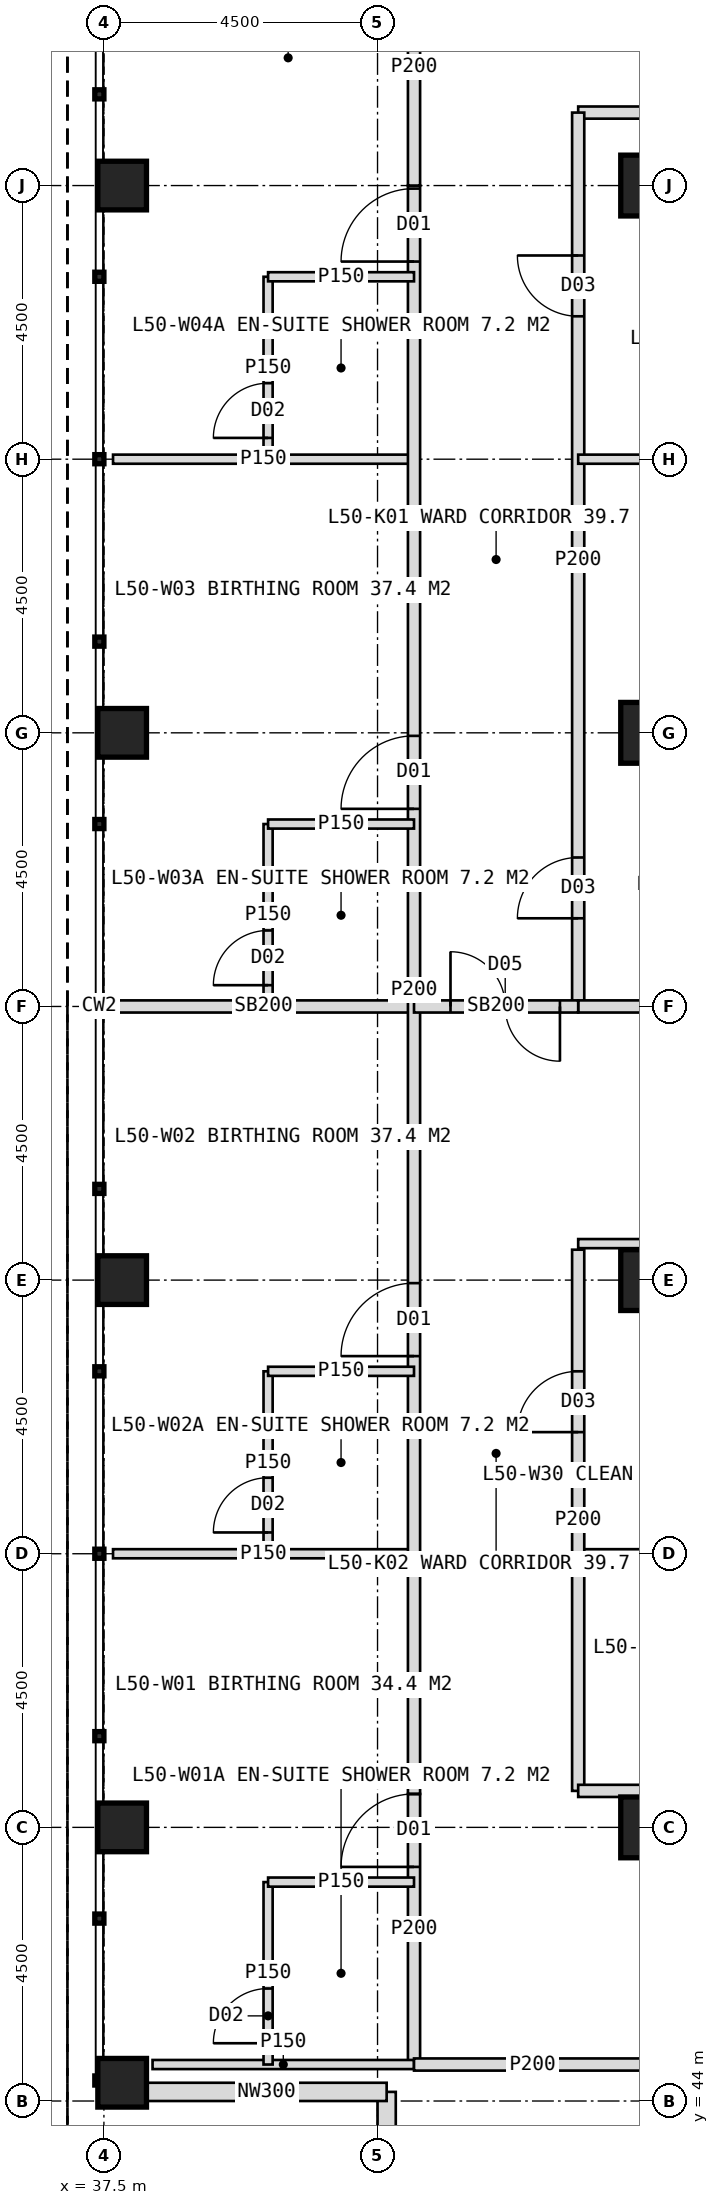
"""IFC4 building model, lengths in metres.
Left out: names, types, materials, properties, quantities, classifications, styles, units other than length and angle.
Written with IfcOpenShell. Run it as: python <this file> out.ifc"""

import sys

from ifc_helpers import new_model, si_unit, direction, frame, frame_2d, origin, origin_2d, place, context, subcontext, project, spatial, rectangle, hollow_rectangle, extrude, element, fill, save


model = new_model("IFC4")
c1 = context("Model", 3, precision=1e-05, world=origin(), true_north=direction((0.0, 1.0)))
c2 = subcontext(c1, "Body", "Model", "MODEL_VIEW")
j1 = project(units=[si_unit("LENGTHUNIT", "METRE"), si_unit("PLANEANGLEUNIT", "RADIAN")], contexts=[c1])
p1 = place(None, origin())
s1 = spatial("IfcSite", under=j1, at=p1, CompositionType="ELEMENT")
p2 = place(p1, origin())
s2 = spatial("IfcBuilding", under=s1, at=p2, CompositionType="ELEMENT")
p3 = place(p2, frame((0.0, 0.0, 209.0)))
s3 = spatial("IfcBuildingStorey", under=s2, at=p3, CompositionType="ELEMENT", Elevation=209.0)
for number, where, z_axis, x_axis in (
    (1, (46.5, 48.5, 0.0), (0.0, 0.0, 1.0), (1.0, 0.0, 0.0)),
    (2, (46.5, 75.5, 0.0), (0.0, 0.0, 1.0), (1.0, 0.0, 0.0)),
    (3, (46.5, 57.5, 0.0), (0.0, 0.0, 1.0), (1.0, 0.0, 0.0)),
    (4, (46.5, 66.5, 0.0), (0.0, 0.0, 1.0), (1.0, 0.0, 0.0)),
):
    element("IfcColumn", number, at=place(p3, frame(where, z_axis=z_axis, x_axis=x_axis)), inside=s3, PredefinedType="COLUMN", context=c2, shape_type="SweptSolid", body=[
        extrude(hollow_rectangle(XDim=1.0, YDim=1.0, WallThickness=0.1, at=origin_2d()), origin(), (0.0, 0.0, 1.0), 4.0),
    ])
for number, where, z_axis, x_axis in (
    (5, (37.8, 44.3, 0.0), (0.0, 0.0, 1.0), (1.0, 0.0, 0.0)),
    (6, (37.8, 48.5, 0.0), (0.0, 0.0, 1.0), (1.0, 0.0, 0.0)),
    (7, (37.8, 57.5, 0.0), (0.0, 0.0, 1.0), (1.0, 0.0, 0.0)),
    (8, (37.8, 66.5, 0.0), (0.0, 0.0, 1.0), (1.0, 0.0, 0.0)),
    (9, (37.8, 75.5, 0.0), (0.0, 0.0, 1.0), (1.0, 0.0, 0.0)),
):
    element("IfcColumn", number, at=place(p3, frame(where, z_axis=z_axis, x_axis=x_axis)), inside=s3, PredefinedType="COLUMN", context=c2, shape_type="SweptSolid", body=[
        extrude(hollow_rectangle(XDim=0.8, YDim=0.8, WallThickness=0.08, at=origin_2d()), origin(), (0.0, 0.0, 1.0), 4.0),
    ])
for number, where, z_axis, x_axis in (
    (10, (42.15, 40.2, 0.0), (0.0, 0.0, 1.0), (0.0, 1.0, 0.0)),
    (11, (42.15, 44.15, 0.0), (0.0, 0.0, 1.0), (-1.0, 0.0, 0.0)),
):
    element("IfcWall", number, at=place(p3, frame(where, z_axis=z_axis, x_axis=x_axis)), inside=s3, PredefinedType="ELEMENTEDWALL", context=c2, shape_type="SweptSolid", body=[
        extrude(rectangle(XDim=3.95, YDim=0.3, at=frame_2d((1.975, 0.0))), origin(), (0.0, 0.0, 1.0), 2.85),
    ])
p4 = place(p3, frame((45.3, 76.7, 0.0), z_axis=(0.0, 0.0, 1.0), x_axis=(1.0, 0.0, 0.0)))
e12 = element("IfcWall", 12, at=p4, inside=s3, PredefinedType="PARTITIONING", context=c2, shape_type="SweptSolid", body=[
    extrude(rectangle(XDim=5.7, YDim=0.2, at=frame_2d((2.85, 0.0))), origin(), (0.0, 0.0, 1.0), 3.75),
])
p5 = place(p3, frame((42.6, 53.0, 0.0), z_axis=(0.0, 0.0, 1.0), x_axis=(-1.0, 0.0, 0.0)))
e13 = element("IfcWall", 13, at=p5, inside=s3, PredefinedType="PARTITIONING", context=c2, shape_type="SweptSolid", body=[
    extrude(rectangle(XDim=4.95, YDim=0.15, at=frame_2d((2.475, 0.0))), origin(), (0.0, 0.0, 1.0), 3.75),
])
p6 = place(p3, frame((42.6, 62.0, 0.0), z_axis=(0.0, 0.0, 1.0), x_axis=(-1.0, 0.0, 0.0)))
e14 = element("IfcWall", 14, at=p6, inside=s3, PredefinedType="SOLIDWALL", context=c2, shape_type="SweptSolid", body=[
    extrude(rectangle(XDim=4.95, YDim=0.2, at=frame_2d((2.475, 0.0))), origin(), (0.0, 0.0, 1.0), 2.95),
])
p7 = place(p3, frame((42.6, 71.0, 0.0), z_axis=(0.0, 0.0, 1.0), x_axis=(-1.0, 0.0, 0.0)))
e15 = element("IfcWall", 15, at=p7, inside=s3, PredefinedType="PARTITIONING", context=c2, shape_type="SweptSolid", body=[
    extrude(rectangle(XDim=4.95, YDim=0.15, at=frame_2d((2.475, 0.0))), origin(), (0.0, 0.0, 1.0), 3.75),
])
p8 = place(p3, frame((42.6, 44.6, 0.0), z_axis=(0.0, 0.0, 1.0), x_axis=(0.0, 1.0, 0.0)))
e16 = element("IfcWall", 16, at=p8, inside=s3, PredefinedType="PARTITIONING", context=c2, shape_type="SweptSolid", body=[
    extrude(rectangle(XDim=4.45, YDim=0.2, at=frame_2d((2.225, 0.0))), origin(), (0.0, 0.0, 1.0), 2.85),
])
p9 = place(p8, frame((3.25, 0.0, 0.0)))
e17 = element("IfcOpeningElement", 17, at=p9, cuts=e16, PredefinedType="OPENING", context=c2, shape_type="SweptSolid", body=[
    extrude(rectangle(XDim=1.2, YDim=2.2, at=frame_2d((0.6, 1.1))), frame((0.0, 0.11, 0.0), z_axis=(0.0, -1.0, 0.0), x_axis=(1.0, 0.0, 0.0)), (0.0, 0.0, 1.0), 0.22),
])
p10 = place(p3, frame((42.6, 49.05, 0.0), z_axis=(0.0, 0.0, 1.0), x_axis=(0.0, 1.0, 0.0)))
e18 = element("IfcWall", 18, at=p10, inside=s3, PredefinedType="PARTITIONING", context=c2, shape_type="SweptSolid", body=[
    extrude(rectangle(XDim=26.45, YDim=0.2, at=frame_2d((13.225, 0.0))), origin(), (0.0, 0.0, 1.0), 3.75),
])
p11 = place(p10, frame((7.2, 0.0, 0.0)))
e19 = element("IfcOpeningElement", 19, at=p11, cuts=e18, PredefinedType="OPENING", context=c2, shape_type="SweptSolid", body=[
    extrude(rectangle(XDim=1.2, YDim=2.2, at=frame_2d((0.6, 1.1))), frame((0.0, 0.11, 0.0), z_axis=(0.0, -1.0, 0.0), x_axis=(1.0, 0.0, 0.0)), (0.0, 0.0, 1.0), 0.22),
])
p12 = place(p10, frame((16.2, 0.0, 0.0)))
e20 = element("IfcOpeningElement", 20, at=p12, cuts=e18, PredefinedType="OPENING", context=c2, shape_type="SweptSolid", body=[
    extrude(rectangle(XDim=1.2, YDim=2.2, at=frame_2d((0.6, 1.1))), frame((0.0, 0.11, 0.0), z_axis=(0.0, -1.0, 0.0), x_axis=(1.0, 0.0, 0.0)), (0.0, 0.0, 1.0), 0.22),
])
p13 = place(p10, frame((25.2, 0.0, 0.0)))
e21 = element("IfcOpeningElement", 21, at=p13, cuts=e18, PredefinedType="OPENING", context=c2, shape_type="SweptSolid", body=[
    extrude(rectangle(XDim=1.2, YDim=2.2, at=frame_2d((0.6, 1.1))), frame((0.0, 0.11, 0.0), z_axis=(0.0, -1.0, 0.0), x_axis=(1.0, 0.0, 0.0)), (0.0, 0.0, 1.0), 0.22),
])
p14 = place(p3, frame((42.6, 75.5, 0.0), z_axis=(0.0, 0.0, 1.0), x_axis=(0.0, 1.0, 0.0)))
e22 = element("IfcWall", 22, at=p14, inside=s3, PredefinedType="PARTITIONING", context=c2, shape_type="SweptSolid", body=[
    extrude(rectangle(XDim=3.9, YDim=0.2, at=frame_2d((1.95, 0.0))), origin(), (0.0, 0.0, 1.0), 2.85),
])
p15 = place(p3, frame((42.6, 44.6, 0.0), z_axis=(0.0, 0.0, 1.0), x_axis=(-1.0, 0.0, 0.0)))
e23 = element("IfcWall", 23, at=p15, inside=s3, PredefinedType="PARTITIONING", context=c2, shape_type="SweptSolid", body=[
    extrude(rectangle(XDim=4.3, YDim=0.15, at=frame_2d((2.15, 0.0))), origin(), (0.0, 0.0, 1.0), 2.85),
])
p16 = place(p3, frame((40.2, 44.6, 0.0), z_axis=(0.0, 0.0, 1.0), x_axis=(0.0, 1.0, 0.0)))
e24 = element("IfcWall", 24, at=p16, inside=s3, PredefinedType="PARTITIONING", context=c2, shape_type="SweptSolid", body=[
    extrude(rectangle(XDim=3.0, YDim=0.15, at=frame_2d((1.5, 0.0))), origin(), (0.0, 0.0, 1.0), 3.75),
])
p17 = place(p16, frame((0.35, 0.0, 0.0)))
e25 = element("IfcOpeningElement", 25, at=p17, cuts=e24, PredefinedType="OPENING", context=c2, shape_type="SweptSolid", body=[
    extrude(rectangle(XDim=0.9, YDim=2.1, at=frame_2d((0.45, 1.05))), frame((0.0, 0.085, 0.0), z_axis=(0.0, -1.0, 0.0), x_axis=(1.0, 0.0, 0.0)), (0.0, 0.0, 1.0), 0.17),
])
p18 = place(p3, frame((42.6, 47.6, 0.0), z_axis=(0.0, 0.0, 1.0), x_axis=(-1.0, 0.0, 0.0)))
e26 = element("IfcWall", 26, at=p18, inside=s3, PredefinedType="PARTITIONING", context=c2, shape_type="SweptSolid", body=[
    extrude(rectangle(XDim=2.4, YDim=0.15, at=frame_2d((1.2, 0.0))), origin(), (0.0, 0.0, 1.0), 3.75),
])
p19 = place(p3, frame((40.2, 53.0, 0.0), z_axis=(0.0, 0.0, 1.0), x_axis=(0.0, 1.0, 0.0)))
e27 = element("IfcWall", 27, at=p19, inside=s3, PredefinedType="PARTITIONING", context=c2, shape_type="SweptSolid", body=[
    extrude(rectangle(XDim=3.0, YDim=0.15, at=frame_2d((1.5, 0.0))), origin(), (0.0, 0.0, 1.0), 3.75),
])
p20 = place(p19, frame((0.35, 0.0, 0.0)))
e28 = element("IfcOpeningElement", 28, at=p20, cuts=e27, PredefinedType="OPENING", context=c2, shape_type="SweptSolid", body=[
    extrude(rectangle(XDim=0.9, YDim=2.1, at=frame_2d((0.45, 1.05))), frame((0.0, 0.085, 0.0), z_axis=(0.0, -1.0, 0.0), x_axis=(1.0, 0.0, 0.0)), (0.0, 0.0, 1.0), 0.17),
])
p21 = place(p3, frame((42.6, 56.0, 0.0), z_axis=(0.0, 0.0, 1.0), x_axis=(-1.0, 0.0, 0.0)))
e29 = element("IfcWall", 29, at=p21, inside=s3, PredefinedType="PARTITIONING", context=c2, shape_type="SweptSolid", body=[
    extrude(rectangle(XDim=2.4, YDim=0.15, at=frame_2d((1.2, 0.0))), origin(), (0.0, 0.0, 1.0), 3.75),
])
p22 = place(p3, frame((40.2, 62.0, 0.0), z_axis=(0.0, 0.0, 1.0), x_axis=(0.0, 1.0, 0.0)))
e30 = element("IfcWall", 30, at=p22, inside=s3, PredefinedType="PARTITIONING", context=c2, shape_type="SweptSolid", body=[
    extrude(rectangle(XDim=3.0, YDim=0.15, at=frame_2d((1.5, 0.0))), origin(), (0.0, 0.0, 1.0), 3.75),
])
p23 = place(p22, frame((0.35, 0.0, 0.0)))
e31 = element("IfcOpeningElement", 31, at=p23, cuts=e30, PredefinedType="OPENING", context=c2, shape_type="SweptSolid", body=[
    extrude(rectangle(XDim=0.9, YDim=2.1, at=frame_2d((0.45, 1.05))), frame((0.0, 0.085, 0.0), z_axis=(0.0, -1.0, 0.0), x_axis=(1.0, 0.0, 0.0)), (0.0, 0.0, 1.0), 0.17),
])
p24 = place(p3, frame((42.6, 65.0, 0.0), z_axis=(0.0, 0.0, 1.0), x_axis=(-1.0, 0.0, 0.0)))
e32 = element("IfcWall", 32, at=p24, inside=s3, PredefinedType="PARTITIONING", context=c2, shape_type="SweptSolid", body=[
    extrude(rectangle(XDim=2.4, YDim=0.15, at=frame_2d((1.2, 0.0))), origin(), (0.0, 0.0, 1.0), 3.75),
])
p25 = place(p3, frame((40.2, 71.0, 0.0), z_axis=(0.0, 0.0, 1.0), x_axis=(0.0, 1.0, 0.0)))
e33 = element("IfcWall", 33, at=p25, inside=s3, PredefinedType="PARTITIONING", context=c2, shape_type="SweptSolid", body=[
    extrude(rectangle(XDim=3.0, YDim=0.15, at=frame_2d((1.5, 0.0))), origin(), (0.0, 0.0, 1.0), 3.75),
])
p26 = place(p25, frame((0.35, 0.0, 0.0)))
e34 = element("IfcOpeningElement", 34, at=p26, cuts=e33, PredefinedType="OPENING", context=c2, shape_type="SweptSolid", body=[
    extrude(rectangle(XDim=0.9, YDim=2.1, at=frame_2d((0.45, 1.05))), frame((0.0, 0.085, 0.0), z_axis=(0.0, -1.0, 0.0), x_axis=(1.0, 0.0, 0.0)), (0.0, 0.0, 1.0), 0.17),
])
p27 = place(p3, frame((42.6, 74.0, 0.0), z_axis=(0.0, 0.0, 1.0), x_axis=(-1.0, 0.0, 0.0)))
e35 = element("IfcWall", 35, at=p27, inside=s3, PredefinedType="PARTITIONING", context=c2, shape_type="SweptSolid", body=[
    extrude(rectangle(XDim=2.4, YDim=0.15, at=frame_2d((1.2, 0.0))), origin(), (0.0, 0.0, 1.0), 3.75),
])
p28 = place(p3, frame((51.0, 53.0, 0.0), z_axis=(0.0, 0.0, 1.0), x_axis=(-1.0, 0.0, 0.0)))
e36 = element("IfcWall", 36, at=p28, inside=s3, PredefinedType="PARTITIONING", context=c2, shape_type="SweptSolid", body=[
    extrude(rectangle(XDim=5.7, YDim=0.15, at=frame_2d((2.85, 0.0))), origin(), (0.0, 0.0, 1.0), 3.75),
])
p29 = place(p3, frame((45.3, 49.1, 0.0), z_axis=(0.0, 0.0, 1.0), x_axis=(0.0, 1.0, 0.0)))
e37 = element("IfcWall", 37, at=p29, inside=s3, PredefinedType="PARTITIONING", context=c2, shape_type="SweptSolid", body=[
    extrude(rectangle(XDim=8.9, YDim=0.2, at=frame_2d((4.45, 0.0))), origin(), (0.0, 0.0, 1.0), 3.75),
])
p30 = place(p29, frame((5.9, 0.0, 0.0)))
e38 = element("IfcOpeningElement", 38, at=p30, cuts=e37, PredefinedType="OPENING", context=c2, shape_type="SweptSolid", body=[
    extrude(rectangle(XDim=1.0, YDim=2.1, at=frame_2d((0.5, 1.05))), frame((0.0, 0.11, 0.0), z_axis=(0.0, -1.0, 0.0), x_axis=(1.0, 0.0, 0.0)), (0.0, 0.0, 1.0), 0.22),
])
p31 = place(p3, frame((45.3, 62.0, 0.0), z_axis=(0.0, 0.0, 1.0), x_axis=(0.0, 1.0, 0.0)))
e39 = element("IfcWall", 39, at=p31, inside=s3, PredefinedType="PARTITIONING", context=c2, shape_type="SweptSolid", body=[
    extrude(rectangle(XDim=14.7, YDim=0.2, at=frame_2d((7.35, 0.0))), origin(), (0.0, 0.0, 1.0), 3.75),
])
p32 = place(p31, frame((1.45, 0.0, 0.0)))
e40 = element("IfcOpeningElement", 40, at=p32, cuts=e39, PredefinedType="OPENING", context=c2, shape_type="SweptSolid", body=[
    extrude(rectangle(XDim=1.0, YDim=2.1, at=frame_2d((0.5, 1.05))), frame((0.0, 0.11, 0.0), z_axis=(0.0, -1.0, 0.0), x_axis=(1.0, 0.0, 0.0)), (0.0, 0.0, 1.0), 0.22),
])
p33 = place(p31, frame((11.35, 0.0, 0.0)))
e41 = element("IfcOpeningElement", 41, at=p33, cuts=e39, PredefinedType="OPENING", context=c2, shape_type="SweptSolid", body=[
    extrude(rectangle(XDim=1.0, YDim=2.1, at=frame_2d((0.5, 1.05))), frame((0.0, 0.11, 0.0), z_axis=(0.0, -1.0, 0.0), x_axis=(1.0, 0.0, 0.0)), (0.0, 0.0, 1.0), 0.22),
])
p34 = place(p3, frame((51.0, 58.1, 0.0), z_axis=(0.0, 0.0, 1.0), x_axis=(-1.0, 0.0, 0.0)))
e42 = element("IfcWall", 42, at=p34, inside=s3, PredefinedType="PARTITIONING", context=c2, shape_type="SweptSolid", body=[
    extrude(rectangle(XDim=5.7, YDim=0.15, at=frame_2d((2.85, 0.0))), origin(), (0.0, 0.0, 1.0), 3.75),
])
p35 = place(p34, frame((0.6, 0.0, 0.0)))
e43 = element("IfcOpeningElement", 43, at=p35, cuts=e42, PredefinedType="OPENING", context=c2, shape_type="SweptSolid", body=[
    extrude(rectangle(XDim=0.9, YDim=2.1, at=frame_2d((0.45, 1.05))), frame((0.0, 0.085, 0.0), z_axis=(0.0, -1.0, 0.0), x_axis=(1.0, 0.0, 0.0)), (0.0, 0.0, 1.0), 0.17),
])
p36 = place(p3, frame((51.0, 62.0, 0.0), z_axis=(0.0, 0.0, 1.0), x_axis=(-1.0, 0.0, 0.0)))
e44 = element("IfcWall", 44, at=p36, inside=s3, PredefinedType="SOLIDWALL", context=c2, shape_type="SweptSolid", body=[
    extrude(rectangle(XDim=5.7, YDim=0.2, at=frame_2d((2.85, 0.0))), origin(), (0.0, 0.0, 1.0), 2.95),
])
p37 = place(p3, frame((51.0, 71.0, 0.0), z_axis=(0.0, 0.0, 1.0), x_axis=(-1.0, 0.0, 0.0)))
e45 = element("IfcWall", 45, at=p37, inside=s3, PredefinedType="PARTITIONING", context=c2, shape_type="SweptSolid", body=[
    extrude(rectangle(XDim=5.7, YDim=0.15, at=frame_2d((2.85, 0.0))), origin(), (0.0, 0.0, 1.0), 3.75),
])
p38 = place(p3, frame((46.5, 44.6, 0.0), z_axis=(0.0, 0.0, 1.0), x_axis=(-1.0, 0.0, 0.0)))
e46 = element("IfcWall", 46, at=p38, inside=s3, PredefinedType="PARTITIONING", context=c2, shape_type="SweptSolid", body=[
    extrude(rectangle(XDim=3.9, YDim=0.2, at=frame_2d((1.95, 0.0))), origin(), (0.0, 0.0, 1.0), 2.85),
])
p39 = place(p3, frame((57.75, 49.1, 0.0), z_axis=(0.0, 0.0, 1.0), x_axis=(-1.0, 0.0, 0.0)))
e47 = element("IfcWall", 47, at=p39, inside=s3, PredefinedType="PARTITIONING", context=c2, shape_type="SweptSolid", body=[
    extrude(rectangle(XDim=12.45, YDim=0.2, at=frame_2d((6.225, 0.0))), origin(), (0.0, 0.0, 1.0), 3.75),
])
p40 = place(p39, frame((0.325, 0.0, 0.0)))
e48 = element("IfcOpeningElement", 48, at=p40, cuts=e47, PredefinedType="OPENING", context=c2, shape_type="SweptSolid", body=[
    extrude(rectangle(XDim=1.0, YDim=2.1, at=frame_2d((0.5, 1.05))), frame((0.0, 0.11, 0.0), z_axis=(0.0, -1.0, 0.0), x_axis=(1.0, 0.0, 0.0)), (0.0, 0.0, 1.0), 0.22),
])
p41 = place(p39, frame((4.75, 0.0, 0.0)))
e49 = element("IfcOpeningElement", 49, at=p41, cuts=e47, PredefinedType="OPENING", context=c2, shape_type="SweptSolid", body=[
    extrude(rectangle(XDim=1.0, YDim=2.1, at=frame_2d((0.5, 1.05))), frame((0.0, 0.11, 0.0), z_axis=(0.0, -1.0, 0.0), x_axis=(1.0, 0.0, 0.0)), (0.0, 0.0, 1.0), 0.22),
])
p42 = place(p39, frame((9.1, 0.0, 0.0)))
e50 = element("IfcOpeningElement", 50, at=p42, cuts=e47, PredefinedType="OPENING", context=c2, shape_type="SweptSolid", body=[
    extrude(rectangle(XDim=1.0, YDim=2.1, at=frame_2d((0.5, 1.05))), frame((0.0, 0.11, 0.0), z_axis=(0.0, -1.0, 0.0), x_axis=(1.0, 0.0, 0.0)), (0.0, 0.0, 1.0), 0.22),
])
p43 = place(p3, frame((45.3, 62.0, 0.0), z_axis=(0.0, 0.0, 1.0), x_axis=(-1.0, 0.0, 0.0)))
e51 = element("IfcWall", 51, at=p43, inside=s3, PredefinedType="SOLIDWALL", context=c2, shape_type="SweptSolid", body=[
    extrude(rectangle(XDim=2.7, YDim=0.2, at=frame_2d((1.35, 0.0))), origin(), (0.0, 0.0, 1.0), 2.95),
])
p44 = place(p43, frame((0.3, 0.0, 0.0)))
e52 = element("IfcOpeningElement", 52, at=p44, cuts=e51, PredefinedType="OPENING", context=c2, shape_type="SweptSolid", body=[
    extrude(rectangle(XDim=1.8, YDim=2.2, at=frame_2d((0.9, 1.1))), frame((0.0, 0.11, 0.0), z_axis=(0.0, -1.0, 0.0), x_axis=(1.0, 0.0, 0.0)), (0.0, 0.0, 1.0), 0.22),
])
p45 = place(p9, origin())
e53 = element("IfcDoor", 53, at=p45, inside=s3, OperationType="SINGLE_SWING_LEFT", PredefinedType="DOOR", context=c2, shape_type="SweptSolid", body=[
    extrude(rectangle(XDim=1.2, YDim=2.2, at=frame_2d((0.6, 1.1))), frame((0.0, 0.025, 0.0), z_axis=(0.0, -1.0, 0.0), x_axis=(1.0, 0.0, 0.0)), (0.0, 0.0, 1.0), 0.05),
])
fill(e17, e53)
p46 = place(p17, origin())
e54 = element("IfcDoor", 54, at=p46, inside=s3, OperationType="SINGLE_SWING_LEFT", PredefinedType="DOOR", context=c2, shape_type="SweptSolid", body=[
    extrude(rectangle(XDim=0.9, YDim=2.1, at=frame_2d((0.45, 1.05))), frame((0.0, 0.025, 0.0), z_axis=(0.0, -1.0, 0.0), x_axis=(1.0, 0.0, 0.0)), (0.0, 0.0, 1.0), 0.05),
])
fill(e25, e54)
p47 = place(p11, origin())
e55 = element("IfcDoor", 55, at=p47, inside=s3, OperationType="SINGLE_SWING_LEFT", PredefinedType="DOOR", context=c2, shape_type="SweptSolid", body=[
    extrude(rectangle(XDim=1.2, YDim=2.2, at=frame_2d((0.6, 1.1))), frame((0.0, 0.025, 0.0), z_axis=(0.0, -1.0, 0.0), x_axis=(1.0, 0.0, 0.0)), (0.0, 0.0, 1.0), 0.05),
])
fill(e19, e55)
p48 = place(p20, origin())
e56 = element("IfcDoor", 56, at=p48, inside=s3, OperationType="SINGLE_SWING_LEFT", PredefinedType="DOOR", context=c2, shape_type="SweptSolid", body=[
    extrude(rectangle(XDim=0.9, YDim=2.1, at=frame_2d((0.45, 1.05))), frame((0.0, 0.025, 0.0), z_axis=(0.0, -1.0, 0.0), x_axis=(1.0, 0.0, 0.0)), (0.0, 0.0, 1.0), 0.05),
])
fill(e28, e56)
p49 = place(p12, origin())
e57 = element("IfcDoor", 57, at=p49, inside=s3, OperationType="SINGLE_SWING_LEFT", PredefinedType="DOOR", context=c2, shape_type="SweptSolid", body=[
    extrude(rectangle(XDim=1.2, YDim=2.2, at=frame_2d((0.6, 1.1))), frame((0.0, 0.025, 0.0), z_axis=(0.0, -1.0, 0.0), x_axis=(1.0, 0.0, 0.0)), (0.0, 0.0, 1.0), 0.05),
])
fill(e20, e57)
p50 = place(p23, origin())
e58 = element("IfcDoor", 58, at=p50, inside=s3, OperationType="SINGLE_SWING_LEFT", PredefinedType="DOOR", context=c2, shape_type="SweptSolid", body=[
    extrude(rectangle(XDim=0.9, YDim=2.1, at=frame_2d((0.45, 1.05))), frame((0.0, 0.025, 0.0), z_axis=(0.0, -1.0, 0.0), x_axis=(1.0, 0.0, 0.0)), (0.0, 0.0, 1.0), 0.05),
])
fill(e31, e58)
p51 = place(p13, origin())
e59 = element("IfcDoor", 59, at=p51, inside=s3, OperationType="SINGLE_SWING_LEFT", PredefinedType="DOOR", context=c2, shape_type="SweptSolid", body=[
    extrude(rectangle(XDim=1.2, YDim=2.2, at=frame_2d((0.6, 1.1))), frame((0.0, 0.025, 0.0), z_axis=(0.0, -1.0, 0.0), x_axis=(1.0, 0.0, 0.0)), (0.0, 0.0, 1.0), 0.05),
])
fill(e21, e59)
p52 = place(p26, origin())
e60 = element("IfcDoor", 60, at=p52, inside=s3, OperationType="SINGLE_SWING_LEFT", PredefinedType="DOOR", context=c2, shape_type="SweptSolid", body=[
    extrude(rectangle(XDim=0.9, YDim=2.1, at=frame_2d((0.45, 1.05))), frame((0.0, 0.025, 0.0), z_axis=(0.0, -1.0, 0.0), x_axis=(1.0, 0.0, 0.0)), (0.0, 0.0, 1.0), 0.05),
])
fill(e34, e60)
p53 = place(p30, origin())
e61 = element("IfcDoor", 61, at=p53, inside=s3, OperationType="SINGLE_SWING_LEFT", PredefinedType="DOOR", context=c2, shape_type="SweptSolid", body=[
    extrude(rectangle(XDim=1.0, YDim=2.1, at=frame_2d((0.5, 1.05))), frame((0.0, 0.025, 0.0), z_axis=(0.0, -1.0, 0.0), x_axis=(1.0, 0.0, 0.0)), (0.0, 0.0, 1.0), 0.05),
])
fill(e38, e61)
p54 = place(p32, origin())
e62 = element("IfcDoor", 62, at=p54, inside=s3, OperationType="SINGLE_SWING_LEFT", PredefinedType="DOOR", context=c2, shape_type="SweptSolid", body=[
    extrude(rectangle(XDim=1.0, YDim=2.1, at=frame_2d((0.5, 1.05))), frame((0.0, 0.025, 0.0), z_axis=(0.0, -1.0, 0.0), x_axis=(1.0, 0.0, 0.0)), (0.0, 0.0, 1.0), 0.05),
])
fill(e40, e62)
p55 = place(p33, origin())
e63 = element("IfcDoor", 63, at=p55, inside=s3, OperationType="SINGLE_SWING_RIGHT", PredefinedType="DOOR", context=c2, shape_type="SweptSolid", body=[
    extrude(rectangle(XDim=1.0, YDim=2.1, at=frame_2d((0.5, 1.05))), frame((0.0, 0.025, 0.0), z_axis=(0.0, -1.0, 0.0), x_axis=(1.0, 0.0, 0.0)), (0.0, 0.0, 1.0), 0.05),
])
fill(e41, e63)
p56 = place(p44, origin())
e64 = element("IfcDoor", 64, at=p56, inside=s3, OperationType="DOUBLE_DOOR_DOUBLE_SWING", PredefinedType="DOOR", context=c2, shape_type="SweptSolid", body=[
    extrude(rectangle(XDim=1.8, YDim=2.2, at=frame_2d((0.9, 1.1))), frame((0.0, 0.025, 0.0), z_axis=(0.0, -1.0, 0.0), x_axis=(1.0, 0.0, 0.0)), (0.0, 0.0, 1.0), 0.05),
])
fill(e52, e64)
save(model, sys.argv[1])
